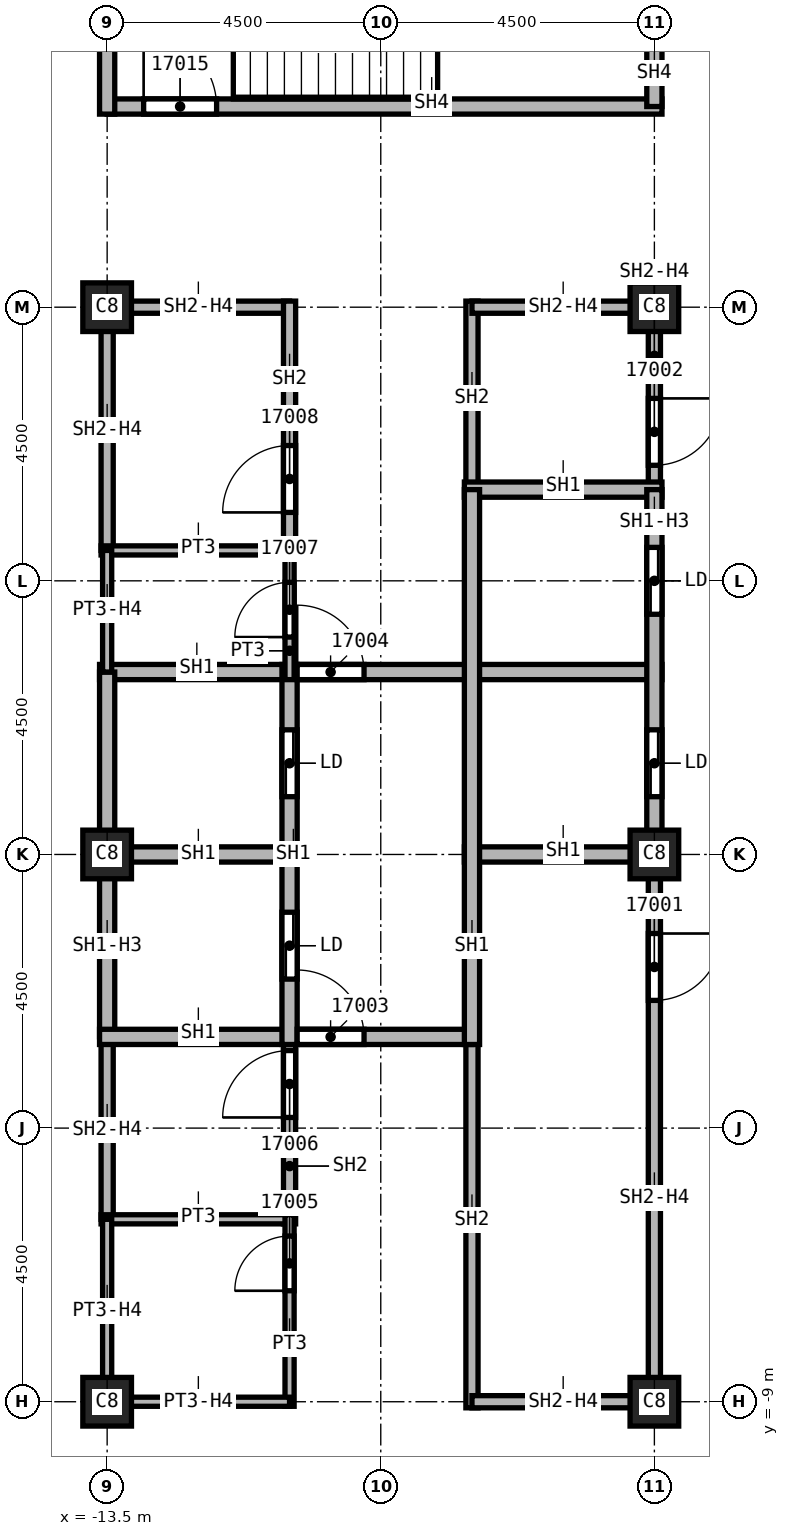
"""IFC4 building model, lengths in metres.
Left out: names, types, materials, properties, quantities, classifications, styles, units other than length and angle.
Written with IfcOpenShell. Run it as: python <this file> out.ifc"""

import sys

from ifc_helpers import new_model, si_unit, direction, frame, frame_2d, origin, origin_2d, place, context, subcontext, project, spatial, rectangle, extrude, element, fill, save


model = new_model("IFC4")
c1 = context("Model", 3, precision=1e-05, world=origin(), true_north=direction((0.0, 1.0)))
c2 = subcontext(c1, "Body", "Model", "MODEL_VIEW")
j1 = project(units=[si_unit("LENGTHUNIT", "METRE"), si_unit("PLANEANGLEUNIT", "RADIAN")], contexts=[c1])
p1 = place(None, origin())
s1 = spatial("IfcSite", under=j1, at=p1, CompositionType="ELEMENT")
p2 = place(p1, origin())
s2 = spatial("IfcBuilding", under=s1, at=p2, CompositionType="ELEMENT")
p3 = place(p2, frame((0.0, 0.0, 254.0)))
s3 = spatial("IfcBuildingStorey", under=s2, at=p3, CompositionType="ELEMENT", Elevation=254.0)
for number, where, z_axis, x_axis in (
    (1, (-4.5, 0.0, 0.0), (0.0, 0.0, 1.0), (1.0, 0.0, 0.0)),
    (2, (-4.5, 9.0, 0.0), (0.0, 0.0, 1.0), (1.0, 0.0, 0.0)),
    (3, (-4.5, -9.0, 0.0), (0.0, 0.0, 1.0), (1.0, 0.0, 0.0)),
    (4, (-13.5, 0.0, 0.0), (0.0, 0.0, 1.0), (1.0, 0.0, 0.0)),
    (5, (-13.5, 9.0, 0.0), (0.0, 0.0, 1.0), (1.0, 0.0, 0.0)),
    (6, (-13.5, -9.0, 0.0), (0.0, 0.0, 1.0), (1.0, 0.0, 0.0)),
):
    element("IfcColumn", number, at=place(p3, frame(where, z_axis=z_axis, x_axis=x_axis)), inside=s3, PredefinedType="COLUMN", context=c2, shape_type="SweptSolid", body=[
        extrude(rectangle(XDim=0.8, YDim=0.8, at=origin_2d()), origin(), (0.0, 0.0, 1.0), 3.72),
    ])
p4 = place(p3, frame((-13.5, -6.0, 0.0), z_axis=(0.0, 0.0, 1.0), x_axis=(0.0, 1.0, 0.0)))
e7 = element("IfcWall", 7, at=p4, inside=s3, PredefinedType="SOLIDWALL", context=c2, shape_type="SweptSolid", body=[
    extrude(rectangle(XDim=3.0, YDim=0.2, at=frame_2d((1.5, 0.0))), origin(), (0.0, 0.0, 1.0), 3.042),
])
p5 = place(p3, frame((-13.5, 5.0, 0.0), z_axis=(0.0, 0.0, 1.0), x_axis=(0.0, 1.0, 0.0)))
e8 = element("IfcWall", 8, at=p5, inside=s3, PredefinedType="SOLIDWALL", context=c2, shape_type="SweptSolid", body=[
    extrude(rectangle(XDim=4.1, YDim=0.2, at=frame_2d((2.05, 0.0))), origin(), (0.0, 0.0, 1.0), 3.042),
])
p6 = place(p3, frame((-13.5, 9.0, 0.0), z_axis=(0.0, 0.0, 1.0), x_axis=(1.0, 0.0, 0.0)))
e9 = element("IfcWall", 9, at=p6, inside=s3, PredefinedType="SOLIDWALL", context=c2, shape_type="SweptSolid", body=[
    extrude(rectangle(XDim=3.0, YDim=0.2, at=frame_2d((1.5, 0.0))), origin(), (0.0, 0.0, 1.0), 3.042),
])
p7 = place(p3, frame((-10.5, -6.075, 0.0), z_axis=(0.0, 0.0, 1.0), x_axis=(0.0, 1.0, 0.0)))
e10 = element("IfcWall", 10, at=p7, inside=s3, PredefinedType="SOLIDWALL", context=c2, shape_type="SweptSolid", body=[
    extrude(rectangle(XDim=3.2, YDim=0.2, at=frame_2d((1.6, 0.0))), origin(), (0.0, 0.0, 1.0), 3.72),
])
p8 = place(p7, frame((1.75, 0.0, 0.0)))
e11 = element("IfcOpeningElement", 11, at=p8, cuts=e10, PredefinedType="OPENING", context=c2, shape_type="SweptSolid", body=[
    extrude(rectangle(XDim=1.1, YDim=2.1, at=frame_2d((0.55, 1.05))), frame((0.0, 0.1, 0.0), z_axis=(0.0, -1.0, 0.0), x_axis=(1.0, 0.0, 0.0)), (0.0, 0.0, 1.0), 0.2),
])
p9 = place(p3, frame((-10.5, 4.925, 0.0), z_axis=(0.0, 0.0, 1.0), x_axis=(0.0, 1.0, 0.0)))
e12 = element("IfcWall", 12, at=p9, inside=s3, PredefinedType="SOLIDWALL", context=c2, shape_type="SweptSolid", body=[
    extrude(rectangle(XDim=4.175, YDim=0.2, at=frame_2d((2.087, 0.0))), origin(), (0.0, 0.0, 1.0), 3.72),
])
p10 = place(p9, frame((0.7, 0.0, 0.0)))
e13 = element("IfcOpeningElement", 13, at=p10, cuts=e12, PredefinedType="OPENING", context=c2, shape_type="SweptSolid", body=[
    extrude(rectangle(XDim=1.1, YDim=2.1, at=frame_2d((0.55, 1.05))), frame((0.0, 0.1, 0.0), z_axis=(0.0, -1.0, 0.0), x_axis=(1.0, 0.0, 0.0)), (0.0, 0.0, 1.0), 0.2),
])
p11 = place(p3, frame((-7.5, -9.1, 0.0), z_axis=(0.0, 0.0, 1.0), x_axis=(0.0, 1.0, 0.0)))
e14 = element("IfcWall", 14, at=p11, inside=s3, PredefinedType="SOLIDWALL", context=c2, shape_type="SweptSolid", body=[
    extrude(rectangle(XDim=6.225, YDim=0.2, at=frame_2d((3.113, 0.0))), origin(), (0.0, 0.0, 1.0), 3.72),
])
p12 = place(p3, frame((-7.5, 6.0, 0.0), z_axis=(0.0, 0.0, 1.0), x_axis=(0.0, 1.0, 0.0)))
e15 = element("IfcWall", 15, at=p12, inside=s3, PredefinedType="SOLIDWALL", context=c2, shape_type="SweptSolid", body=[
    extrude(rectangle(XDim=3.1, YDim=0.2, at=frame_2d((1.55, 0.0))), origin(), (0.0, 0.0, 1.0), 3.72),
])
for number, where, z_axis, x_axis in (
    (16, (-7.5, 9.0, 0.0), (0.0, 0.0, 1.0), (1.0, 0.0, 0.0)),
    (17, (-4.5, -9.0, 0.0), (0.0, 0.0, 1.0), (-1.0, 0.0, 0.0)),
):
    element("IfcWall", number, at=place(p3, frame(where, z_axis=z_axis, x_axis=x_axis)), inside=s3, PredefinedType="SOLIDWALL", context=c2, shape_type="SweptSolid", body=[
        extrude(rectangle(XDim=3.0, YDim=0.2, at=frame_2d((1.5, 0.0))), origin(), (0.0, 0.0, 1.0), 3.042),
    ])
p13 = place(p3, frame((-4.5, 0.0, 0.0), z_axis=(0.0, 0.0, 1.0), x_axis=(0.0, -1.0, 0.0)))
e18 = element("IfcWall", 18, at=p13, inside=s3, PredefinedType="SOLIDWALL", context=c2, shape_type="SweptSolid", body=[
    extrude(rectangle(XDim=9.1, YDim=0.2, at=frame_2d((4.55, 0.0))), origin(), (0.0, 0.0, 1.0), 3.042),
])
p14 = place(p13, frame((1.3, 0.0, 0.0)))
e19 = element("IfcOpeningElement", 19, at=p14, cuts=e18, PredefinedType="OPENING", context=c2, shape_type="SweptSolid", body=[
    extrude(rectangle(XDim=1.1, YDim=2.1, at=frame_2d((0.55, 1.05))), frame((0.0, 0.1, 0.0), z_axis=(0.0, -1.0, 0.0), x_axis=(1.0, 0.0, 0.0)), (0.0, 0.0, 1.0), 0.2),
])
p15 = place(p3, frame((-4.5, 9.1, 0.0), z_axis=(0.0, 0.0, 1.0), x_axis=(0.0, -1.0, 0.0)))
e20 = element("IfcWall", 20, at=p15, inside=s3, PredefinedType="SOLIDWALL", context=c2, shape_type="SweptSolid", body=[
    extrude(rectangle(XDim=3.1, YDim=0.2, at=frame_2d((1.55, 0.0))), origin(), (0.0, 0.0, 1.0), 3.042),
])
p16 = place(p15, frame((1.6, 0.0, 0.0)))
e21 = element("IfcOpeningElement", 21, at=p16, cuts=e20, PredefinedType="OPENING", context=c2, shape_type="SweptSolid", body=[
    extrude(rectangle(XDim=1.1, YDim=2.1, at=frame_2d((0.55, 1.05))), frame((0.0, 0.1, 0.0), z_axis=(0.0, -1.0, 0.0), x_axis=(1.0, 0.0, 0.0)), (0.0, 0.0, 1.0), 0.2),
])
p17 = place(p3, frame((-13.625, 0.0, 0.0), z_axis=(0.0, 0.0, 1.0), x_axis=(1.0, 0.0, 0.0)))
e22 = element("IfcWall", 22, at=p17, inside=s3, PredefinedType="SOLIDWALL", context=c2, shape_type="SweptSolid", body=[
    extrude(rectangle(XDim=3.125, YDim=0.25, at=frame_2d((1.562, 0.0))), origin(), (0.0, 0.0, 1.0), 3.72),
])
p18 = place(p3, frame((-13.625, 3.0, 0.0), z_axis=(0.0, 0.0, 1.0), x_axis=(1.0, 0.0, 0.0)))
e23 = element("IfcWall", 23, at=p18, inside=s3, PredefinedType="SOLIDWALL", context=c2, shape_type="SweptSolid", body=[
    extrude(rectangle(XDim=9.25, YDim=0.25, at=frame_2d((4.625, 0.0))), origin(), (0.0, 0.0, 1.0), 3.72),
])
p19 = place(p18, frame((3.25, 0.0, 0.0)))
e24 = element("IfcOpeningElement", 24, at=p19, cuts=e23, PredefinedType="OPENING", context=c2, shape_type="SweptSolid", body=[
    extrude(rectangle(XDim=1.1, YDim=2.1, at=frame_2d((0.55, 1.05))), frame((0.0, 0.125, 0.0), z_axis=(0.0, -1.0, 0.0), x_axis=(1.0, 0.0, 0.0)), (0.0, 0.0, 1.0), 0.25),
])
p20 = place(p3, frame((-13.5, -3.0, 0.0), z_axis=(0.0, 0.0, 1.0), x_axis=(0.0, 1.0, 0.0)))
e25 = element("IfcWall", 25, at=p20, inside=s3, PredefinedType="SOLIDWALL", context=c2, shape_type="SweptSolid", body=[
    extrude(rectangle(XDim=6.0, YDim=0.25, at=frame_2d((3.0, 0.0))), origin(), (0.0, 0.0, 1.0), 3.042),
])
p21 = place(p3, frame((-13.625, -3.0, 0.0), z_axis=(0.0, 0.0, 1.0), x_axis=(1.0, 0.0, 0.0)))
e26 = element("IfcWall", 26, at=p21, inside=s3, PredefinedType="SOLIDWALL", context=c2, shape_type="SweptSolid", body=[
    extrude(rectangle(XDim=6.125, YDim=0.25, at=frame_2d((3.062, 0.0))), origin(), (0.0, 0.0, 1.0), 3.72),
])
p22 = place(p21, frame((3.25, 0.0, 0.0)))
e27 = element("IfcOpeningElement", 27, at=p22, cuts=e26, PredefinedType="OPENING", context=c2, shape_type="SweptSolid", body=[
    extrude(rectangle(XDim=1.1, YDim=2.1, at=frame_2d((0.55, 1.05))), frame((0.0, 0.125, 0.0), z_axis=(0.0, -1.0, 0.0), x_axis=(1.0, 0.0, 0.0)), (0.0, 0.0, 1.0), 0.25),
])
p23 = place(p3, frame((-10.5, -3.125, 0.0), z_axis=(0.0, 0.0, 1.0), x_axis=(0.0, 1.0, 0.0)))
e28 = element("IfcWall", 28, at=p23, inside=s3, PredefinedType="SOLIDWALL", context=c2, shape_type="SweptSolid", body=[
    extrude(rectangle(XDim=6.25, YDim=0.25, at=frame_2d((3.125, 0.0))), origin(), (0.0, 0.0, 1.0), 3.72),
])
p24 = place(p23, frame((1.075, 0.0, 0.0)))
e29 = element("IfcOpeningElement", 29, at=p24, cuts=e28, PredefinedType="OPENING", context=c2, shape_type="SweptSolid", body=[
    extrude(rectangle(XDim=1.1, YDim=2.1, at=frame_2d((0.55, 1.05))), frame((0.0, 0.125, 0.0), z_axis=(0.0, -1.0, 0.0), x_axis=(1.0, 0.0, 0.0)), (0.0, 0.0, 1.0), 0.25),
])
p25 = place(p23, frame((4.075, 0.0, 0.0)))
e30 = element("IfcOpeningElement", 30, at=p25, cuts=e28, PredefinedType="OPENING", context=c2, shape_type="SweptSolid", body=[
    extrude(rectangle(XDim=1.1, YDim=2.1, at=frame_2d((0.55, 1.05))), frame((0.0, 0.125, 0.0), z_axis=(0.0, -1.0, 0.0), x_axis=(1.0, 0.0, 0.0)), (0.0, 0.0, 1.0), 0.25),
])
for number, where, z_axis, x_axis in (
    (31, (-7.625, 0.0, 0.0), (0.0, 0.0, 1.0), (1.0, 0.0, 0.0)),
    (32, (-7.625, 6.0, 0.0), (0.0, 0.0, 1.0), (1.0, 0.0, 0.0)),
):
    element("IfcWall", number, at=place(p3, frame(where, z_axis=z_axis, x_axis=x_axis)), inside=s3, PredefinedType="SOLIDWALL", context=c2, shape_type="SweptSolid", body=[
        extrude(rectangle(XDim=3.25, YDim=0.25, at=frame_2d((1.625, 0.0))), origin(), (0.0, 0.0, 1.0), 3.72),
    ])
p26 = place(p3, frame((-7.5, -3.125, 0.0), z_axis=(0.0, 0.0, 1.0), x_axis=(0.0, 1.0, 0.0)))
e33 = element("IfcWall", 33, at=p26, inside=s3, PredefinedType="SOLIDWALL", context=c2, shape_type="SweptSolid", body=[
    extrude(rectangle(XDim=9.125, YDim=0.25, at=frame_2d((4.562, 0.0))), origin(), (0.0, 0.0, 1.0), 3.72),
])
p27 = place(p3, frame((-4.5, 6.0, 0.0), z_axis=(0.0, 0.0, 1.0), x_axis=(0.0, -1.0, 0.0)))
e34 = element("IfcWall", 34, at=p27, inside=s3, PredefinedType="SOLIDWALL", context=c2, shape_type="SweptSolid", body=[
    extrude(rectangle(XDim=6.0, YDim=0.25, at=frame_2d((3.0, 0.0))), origin(), (0.0, 0.0, 1.0), 3.042),
])
p28 = place(p27, frame((3.95, 0.0, 0.0)))
e35 = element("IfcOpeningElement", 35, at=p28, cuts=e34, PredefinedType="OPENING", context=c2, shape_type="SweptSolid", body=[
    extrude(rectangle(XDim=1.1, YDim=2.1, at=frame_2d((0.55, 1.05))), frame((0.0, 0.125, 0.0), z_axis=(0.0, -1.0, 0.0), x_axis=(1.0, 0.0, 0.0)), (0.0, 0.0, 1.0), 0.25),
])
p29 = place(p27, frame((0.95, 0.0, 0.0)))
e36 = element("IfcOpeningElement", 36, at=p29, cuts=e34, PredefinedType="OPENING", context=c2, shape_type="SweptSolid", body=[
    extrude(rectangle(XDim=1.1, YDim=2.1, at=frame_2d((0.55, 1.05))), frame((0.0, 0.125, 0.0), z_axis=(0.0, -1.0, 0.0), x_axis=(1.0, 0.0, 0.0)), (0.0, 0.0, 1.0), 0.25),
])
p30 = place(p3, frame((-13.5, 12.3, 0.0), z_axis=(0.0, 0.0, 1.0), x_axis=(1.0, 0.0, 0.0)))
e37 = element("IfcWall", 37, at=p30, inside=s3, PredefinedType="SOLIDWALL", context=c2, shape_type="SweptSolid", body=[
    extrude(rectangle(XDim=9.125, YDim=0.25, at=frame_2d((4.562, 0.0))), origin(), (0.0, 0.0, 1.0), 3.72),
])
p31 = place(p30, frame((0.6, 0.0, 0.0)))
e38 = element("IfcOpeningElement", 38, at=p31, cuts=e37, PredefinedType="OPENING", context=c2, shape_type="SweptSolid", body=[
    extrude(rectangle(XDim=1.2, YDim=2.1, at=frame_2d((0.6, 1.05))), frame((0.0, 0.125, 0.0), z_axis=(0.0, -1.0, 0.0), x_axis=(1.0, 0.0, 0.0)), (0.0, 0.0, 1.0), 0.25),
])
p32 = place(p3, frame((-13.5, 16.78, 0.0), z_axis=(0.0, 0.0, 1.0), x_axis=(0.0, -1.0, 0.0)))
e39 = element("IfcWall", 39, at=p32, inside=s3, PredefinedType="SOLIDWALL", context=c2, shape_type="SweptSolid", body=[
    extrude(rectangle(XDim=4.605, YDim=0.25, at=frame_2d((2.302, 0.0))), origin(), (0.0, 0.0, 1.0), 3.72),
])
p33 = place(p3, frame((-4.5, 13.283, 0.0), z_axis=(0.0, 0.0, 1.0), x_axis=(0.0, -1.0, 0.0)))
e40 = element("IfcWall", 40, at=p33, inside=s3, PredefinedType="SOLIDWALL", context=c2, shape_type="SweptSolid", body=[
    extrude(rectangle(XDim=0.983, YDim=0.25, at=frame_2d((0.491, 0.0))), origin(), (0.0, 0.0, 1.0), 3.72),
])
for number, where, z_axis, x_axis in (
    (41, (-13.6, -6.0, 0.0), (0.0, 0.0, 1.0), (1.0, 0.0, 0.0)),
    (42, (-13.6, 5.0, 0.0), (0.0, 0.0, 1.0), (1.0, 0.0, 0.0)),
):
    element("IfcWall", number, at=place(p3, frame(where, z_axis=z_axis, x_axis=x_axis)), inside=s3, PredefinedType="PARTITIONING", context=c2, shape_type="SweptSolid", body=[
        extrude(rectangle(XDim=3.1, YDim=0.15, at=frame_2d((1.55, 0.0))), origin(), (0.0, 0.0, 1.0), 3.72),
    ])
p34 = place(p3, frame((-13.5, -9.075, 0.0), z_axis=(0.0, 0.0, 1.0), x_axis=(0.0, 1.0, 0.0)))
e43 = element("IfcWall", 43, at=p34, inside=s3, PredefinedType="PARTITIONING", context=c2, shape_type="SweptSolid", body=[
    extrude(rectangle(XDim=3.075, YDim=0.15, at=frame_2d((1.538, 0.0))), origin(), (0.0, 0.0, 1.0), 3.042),
])
p35 = place(p3, frame((-13.5, 3.0, 0.0), z_axis=(0.0, 0.0, 1.0), x_axis=(0.0, 1.0, 0.0)))
e44 = element("IfcWall", 44, at=p35, inside=s3, PredefinedType="PARTITIONING", context=c2, shape_type="SweptSolid", body=[
    extrude(rectangle(XDim=2.0, YDim=0.15, at=frame_2d((1.0, 0.0))), origin(), (0.0, 0.0, 1.0), 3.042),
])
p36 = place(p3, frame((-10.5, -9.075, 0.0), z_axis=(0.0, 0.0, 1.0), x_axis=(0.0, 1.0, 0.0)))
e45 = element("IfcWall", 45, at=p36, inside=s3, PredefinedType="PARTITIONING", context=c2, shape_type="SweptSolid", body=[
    extrude(rectangle(XDim=3.15, YDim=0.15, at=frame_2d((1.575, 0.0))), origin(), (0.0, 0.0, 1.0), 3.72),
])
p37 = place(p36, frame((1.9, 0.0, 0.0)))
e46 = element("IfcOpeningElement", 46, at=p37, cuts=e45, PredefinedType="OPENING", context=c2, shape_type="SweptSolid", body=[
    extrude(rectangle(XDim=0.9, YDim=2.1, at=frame_2d((0.45, 1.05))), frame((0.0, 0.075, 0.0), z_axis=(0.0, -1.0, 0.0), x_axis=(1.0, 0.0, 0.0)), (0.0, 0.0, 1.0), 0.15),
])
p38 = place(p3, frame((-10.5, -9.0, 0.0), z_axis=(0.0, 0.0, 1.0), x_axis=(-1.0, 0.0, 0.0)))
e47 = element("IfcWall", 47, at=p38, inside=s3, PredefinedType="PARTITIONING", context=c2, shape_type="SweptSolid", body=[
    extrude(rectangle(XDim=3.0, YDim=0.15, at=frame_2d((1.5, 0.0))), origin(), (0.0, 0.0, 1.0), 3.042),
])
p39 = place(p3, frame((-10.5, 2.875, 0.0), z_axis=(0.0, 0.0, 1.0), x_axis=(0.0, 1.0, 0.0)))
e48 = element("IfcWall", 48, at=p39, inside=s3, PredefinedType="PARTITIONING", context=c2, shape_type="SweptSolid", body=[
    extrude(rectangle(XDim=2.2, YDim=0.15, at=frame_2d((1.1, 0.0))), origin(), (0.0, 0.0, 1.0), 3.72),
])
p40 = place(p39, frame((0.7, 0.0, 0.0)))
e49 = element("IfcOpeningElement", 49, at=p40, cuts=e48, PredefinedType="OPENING", context=c2, shape_type="SweptSolid", body=[
    extrude(rectangle(XDim=0.9, YDim=2.1, at=frame_2d((0.45, 1.05))), frame((0.0, 0.075, 0.0), z_axis=(0.0, -1.0, 0.0), x_axis=(1.0, 0.0, 0.0)), (0.0, 0.0, 1.0), 0.15),
])
p41 = place(p14, origin())
e50 = element("IfcDoor", 50, at=p41, inside=s3, OperationType="SINGLE_SWING_RIGHT", PredefinedType="DOOR", context=c2, shape_type="SweptSolid", body=[
    extrude(rectangle(XDim=1.1, YDim=2.1, at=frame_2d((0.55, 1.05))), frame((0.0, 0.025, 0.0), z_axis=(0.0, -1.0, 0.0), x_axis=(1.0, 0.0, 0.0)), (0.0, 0.0, 1.0), 0.05),
])
fill(e19, e50)
p42 = place(p16, origin())
e51 = element("IfcDoor", 51, at=p42, inside=s3, OperationType="SINGLE_SWING_LEFT", PredefinedType="DOOR", context=c2, shape_type="SweptSolid", body=[
    extrude(rectangle(XDim=1.1, YDim=2.1, at=frame_2d((0.55, 1.05))), frame((0.0, 0.025, 0.0), z_axis=(0.0, -1.0, 0.0), x_axis=(1.0, 0.0, 0.0)), (0.0, 0.0, 1.0), 0.05),
])
fill(e21, e51)
p43 = place(p22, origin())
e52 = element("IfcDoor", 52, at=p43, inside=s3, OperationType="SINGLE_SWING_RIGHT", PredefinedType="DOOR", context=c2, shape_type="SweptSolid", body=[
    extrude(rectangle(XDim=1.1, YDim=2.1, at=frame_2d((0.55, 1.05))), frame((0.0, 0.025, 0.0), z_axis=(0.0, -1.0, 0.0), x_axis=(1.0, 0.0, 0.0)), (0.0, 0.0, 1.0), 0.05),
])
fill(e27, e52)
p44 = place(p19, origin())
e53 = element("IfcDoor", 53, at=p44, inside=s3, OperationType="SINGLE_SWING_LEFT", PredefinedType="DOOR", context=c2, shape_type="SweptSolid", body=[
    extrude(rectangle(XDim=1.1, YDim=2.1, at=frame_2d((0.55, 1.05))), frame((0.0, 0.025, 0.0), z_axis=(0.0, -1.0, 0.0), x_axis=(1.0, 0.0, 0.0)), (0.0, 0.0, 1.0), 0.05),
])
fill(e24, e53)
p45 = place(p37, origin())
e54 = element("IfcDoor", 54, at=p45, inside=s3, OperationType="SINGLE_SWING_RIGHT", PredefinedType="DOOR", context=c2, shape_type="SweptSolid", body=[
    extrude(rectangle(XDim=0.9, YDim=2.1, at=frame_2d((0.45, 1.05))), frame((0.0, 0.025, 0.0), z_axis=(0.0, -1.0, 0.0), x_axis=(1.0, 0.0, 0.0)), (0.0, 0.0, 1.0), 0.05),
])
fill(e46, e54)
p46 = place(p8, origin())
e55 = element("IfcDoor", 55, at=p46, inside=s3, OperationType="SINGLE_SWING_LEFT", PredefinedType="DOOR", context=c2, shape_type="SweptSolid", body=[
    extrude(rectangle(XDim=1.1, YDim=2.1, at=frame_2d((0.55, 1.05))), frame((0.0, 0.025, 0.0), z_axis=(0.0, -1.0, 0.0), x_axis=(1.0, 0.0, 0.0)), (0.0, 0.0, 1.0), 0.05),
])
fill(e11, e55)
p47 = place(p40, origin())
e56 = element("IfcDoor", 56, at=p47, inside=s3, OperationType="SINGLE_SWING_RIGHT", PredefinedType="DOOR", context=c2, shape_type="SweptSolid", body=[
    extrude(rectangle(XDim=0.9, YDim=2.1, at=frame_2d((0.45, 1.05))), frame((0.0, 0.025, 0.0), z_axis=(0.0, -1.0, 0.0), x_axis=(1.0, 0.0, 0.0)), (0.0, 0.0, 1.0), 0.05),
])
fill(e49, e56)
p48 = place(p10, origin())
e57 = element("IfcDoor", 57, at=p48, inside=s3, OperationType="SINGLE_SWING_LEFT", PredefinedType="DOOR", context=c2, shape_type="SweptSolid", body=[
    extrude(rectangle(XDim=1.1, YDim=2.1, at=frame_2d((0.55, 1.05))), frame((0.0, 0.025, 0.0), z_axis=(0.0, -1.0, 0.0), x_axis=(1.0, 0.0, 0.0)), (0.0, 0.0, 1.0), 0.05),
])
fill(e13, e57)
p49 = place(p31, origin())
e58 = element("IfcDoor", 58, at=p49, inside=s3, OperationType="SINGLE_SWING_RIGHT", PredefinedType="DOOR", context=c2, shape_type="SweptSolid", body=[
    extrude(rectangle(XDim=1.2, YDim=2.1, at=frame_2d((0.6, 1.05))), frame((0.0, 0.025, 0.0), z_axis=(0.0, -1.0, 0.0), x_axis=(1.0, 0.0, 0.0)), (0.0, 0.0, 1.0), 0.05),
])
fill(e38, e58)
p50 = place(p28, origin())
e59 = element("IfcDoor", 59, at=p50, inside=s3, OperationType="SLIDING_TO_LEFT", PredefinedType="DOOR", context=c2, shape_type="SweptSolid", body=[
    extrude(rectangle(XDim=1.1, YDim=2.1, at=frame_2d((0.55, 1.05))), frame((0.0, 0.025, 0.0), z_axis=(0.0, -1.0, 0.0), x_axis=(1.0, 0.0, 0.0)), (0.0, 0.0, 1.0), 0.05),
])
fill(e35, e59)
p51 = place(p29, origin())
e60 = element("IfcDoor", 60, at=p51, inside=s3, OperationType="SLIDING_TO_LEFT", PredefinedType="DOOR", context=c2, shape_type="SweptSolid", body=[
    extrude(rectangle(XDim=1.1, YDim=2.1, at=frame_2d((0.55, 1.05))), frame((0.0, 0.025, 0.0), z_axis=(0.0, -1.0, 0.0), x_axis=(1.0, 0.0, 0.0)), (0.0, 0.0, 1.0), 0.05),
])
fill(e36, e60)
p52 = place(p24, origin())
e61 = element("IfcDoor", 61, at=p52, inside=s3, OperationType="SLIDING_TO_LEFT", PredefinedType="DOOR", context=c2, shape_type="SweptSolid", body=[
    extrude(rectangle(XDim=1.1, YDim=2.1, at=frame_2d((0.55, 1.05))), frame((0.0, 0.025, 0.0), z_axis=(0.0, -1.0, 0.0), x_axis=(1.0, 0.0, 0.0)), (0.0, 0.0, 1.0), 0.05),
])
fill(e29, e61)
p53 = place(p25, origin())
e62 = element("IfcDoor", 62, at=p53, inside=s3, OperationType="SLIDING_TO_LEFT", PredefinedType="DOOR", context=c2, shape_type="SweptSolid", body=[
    extrude(rectangle(XDim=1.1, YDim=2.1, at=frame_2d((0.55, 1.05))), frame((0.0, 0.025, 0.0), z_axis=(0.0, -1.0, 0.0), x_axis=(1.0, 0.0, 0.0)), (0.0, 0.0, 1.0), 0.05),
])
fill(e30, e62)
save(model, sys.argv[1])
